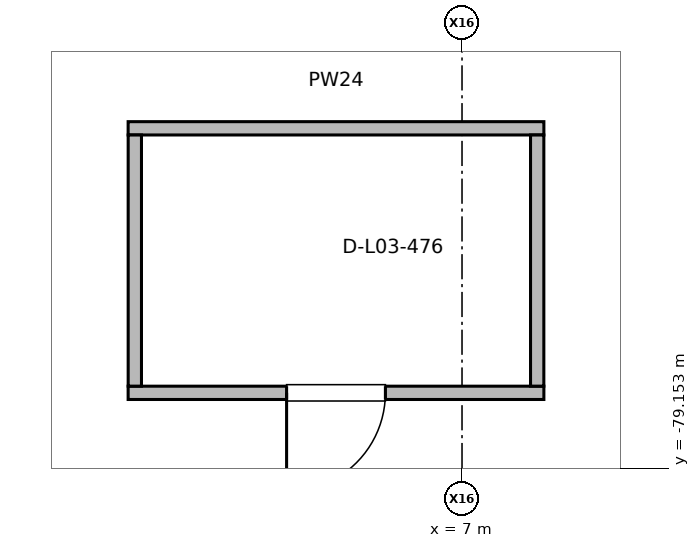
"""IFC4 building model, lengths in metres.
Left out: names, types, materials, properties, quantities, classifications, styles, units other than length and angle.
Written with IfcOpenShell. Run it as: python <this file> out.ifc"""

import sys

from ifc_helpers import new_model, si_unit, direction, frame, frame_2d, origin, place, context, subcontext, project, spatial, rectangle, extrude, element, fill, save


model = new_model("IFC4")
c1 = context("Model", 3, precision=1e-05, world=origin(), true_north=direction((0.0, 1.0)))
c2 = subcontext(c1, "Body", "Model", "MODEL_VIEW")
j1 = project(units=[si_unit("LENGTHUNIT", "METRE"), si_unit("PLANEANGLEUNIT", "RADIAN")], contexts=[c1])
p1 = place(None, origin())
s1 = spatial("IfcSite", under=j1, at=p1, CompositionType="ELEMENT")
p2 = place(p1, origin())
s2 = spatial("IfcBuilding", under=s1, at=p2, CompositionType="ELEMENT")
p3 = place(p2, frame((0.0, 0.0, 11.4)))
s3 = spatial("IfcBuildingStorey", under=s2, at=p3, CompositionType="ELEMENT", Elevation=11.4)
p4 = place(p3, frame((8.077, -78.16, 0.0), z_axis=(0.0, 0.0, 1.0), x_axis=(-1.0, 0.0, 0.0)))
e1 = element("IfcWall", 1, at=p4, inside=s3, PredefinedType="PARTITIONING", context=c2, shape_type="SweptSolid", body=[
    extrude(rectangle(XDim=5.47, YDim=0.175, at=frame_2d((2.735, 0.0))), origin(), (0.0, 0.0, 1.0), 3.82),
])
p5 = place(p4, frame((2.085, 0.0, 0.0)))
e2 = element("IfcOpeningElement", 2, at=p5, cuts=e1, PredefinedType="OPENING", context=c2, shape_type="SweptSolid", body=[
    extrude(rectangle(XDim=1.3, YDim=2.3, at=frame_2d((0.65, 1.15))), frame((0.0, 0.097, 0.0), z_axis=(0.0, -1.0, 0.0), x_axis=(1.0, 0.0, 0.0)), (0.0, 0.0, 1.0), 0.195),
])
p6 = place(p3, frame((2.607, -74.68, 0.0), z_axis=(0.0, 0.0, 1.0), x_axis=(1.0, 0.0, 0.0)))
e3 = element("IfcWall", 3, at=p6, inside=s3, PredefinedType="PARTITIONING", context=c2, shape_type="SweptSolid", body=[
    extrude(rectangle(XDim=5.47, YDim=0.175, at=frame_2d((2.735, 0.0))), origin(), (0.0, 0.0, 1.0), 3.82),
])
for number, where, z_axis, x_axis in (
    (4, (2.695, -78.072, 0.0), (0.0, 0.0, 1.0), (0.0, 1.0, 0.0)),
    (5, (7.989, -78.072, 0.0), (0.0, 0.0, 1.0), (0.0, 1.0, 0.0)),
):
    element("IfcWall", number, at=place(p3, frame(where, z_axis=z_axis, x_axis=x_axis)), inside=s3, PredefinedType="PARTITIONING", context=c2, shape_type="SweptSolid", body=[
        extrude(rectangle(XDim=3.304, YDim=0.175, at=frame_2d((1.652, 0.0))), origin(), (0.0, 0.0, 1.0), 3.82),
    ])
p7 = place(p5, origin())
e6 = element("IfcDoor", 6, at=p7, inside=s3, OperationType="SINGLE_SWING_RIGHT", PredefinedType="DOOR", context=c2, shape_type="SweptSolid", body=[
    extrude(rectangle(XDim=1.3, YDim=2.3, at=frame_2d((0.65, 1.15))), frame((0.0, 0.025, 0.0), z_axis=(0.0, -1.0, 0.0), x_axis=(1.0, 0.0, 0.0)), (0.0, 0.0, 1.0), 0.05),
])
fill(e2, e6)
save(model, sys.argv[1])
